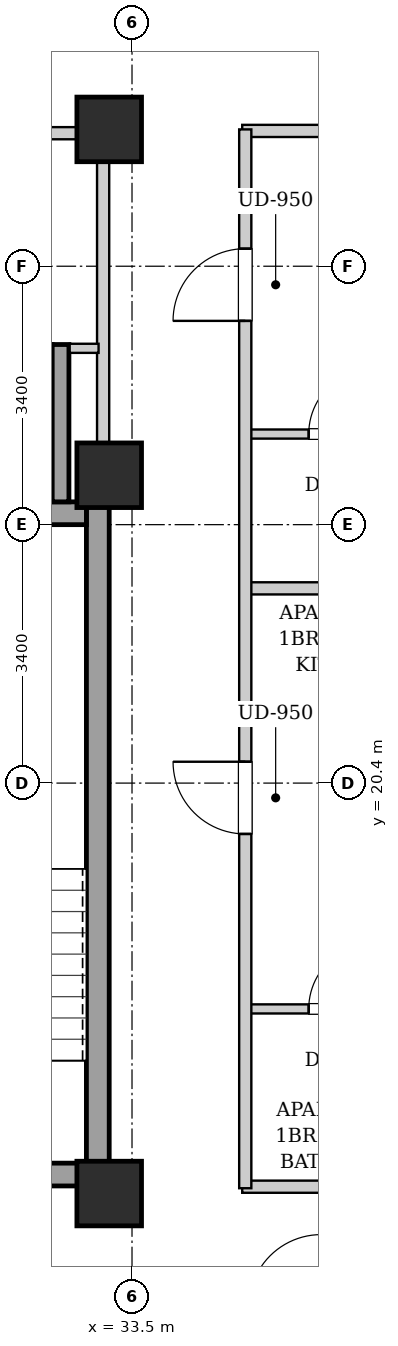
"""IFC4 building model, lengths in metres.
Left out: names, types, materials, properties, quantities, classifications, styles, units other than length and angle.
Written with IfcOpenShell. Run it as: python <this file> out.ifc"""

import sys

from ifc_helpers import new_model, si_unit, direction, frame, frame_2d, origin, origin_2d, place, context, subcontext, project, spatial, rectangle, extrude, element, fill, save


model = new_model("IFC4")
c1 = context("Model", 3, precision=1e-05, world=origin(), true_north=direction((0.0, 1.0)))
c2 = subcontext(c1, "Body", "Model", "MODEL_VIEW")
j1 = project(units=[si_unit("LENGTHUNIT", "METRE"), si_unit("PLANEANGLEUNIT", "RADIAN")], contexts=[c1])
p1 = place(None, origin())
s1 = spatial("IfcSite", under=j1, at=p1, CompositionType="ELEMENT")
p2 = place(p1, origin())
s2 = spatial("IfcBuilding", under=s1, at=p2, CompositionType="ELEMENT")
p3 = place(p2, frame((0.0, 0.0, 187.6)))
s3 = spatial("IfcBuildingStorey", under=s2, at=p3, CompositionType="ELEMENT", Elevation=187.6)
for number, where, z_axis, x_axis in (
    (1, (33.2, 15.0, 0.0), (0.0, 0.0, 1.0), (1.0, 0.0, 0.0)),
    (2, (33.2, 29.0, 0.0), (0.0, 0.0, 1.0), (1.0, 0.0, 0.0)),
    (3, (33.2, 24.45, 0.0), (0.0, 0.0, 1.0), (1.0, 0.0, 0.0)),
):
    element("IfcColumn", number, at=place(p3, frame(where, z_axis=z_axis, x_axis=x_axis)), inside=s3, PredefinedType="COLUMN", context=c2, shape_type="SweptSolid", body=[
        extrude(rectangle(XDim=0.85, YDim=0.85, at=origin_2d()), origin(), (0.0, 0.0, 1.0), 3.3),
    ])
p4 = place(p3, frame((33.05, 15.1, 0.0), z_axis=(0.0, 0.0, 1.0), x_axis=(0.0, 1.0, 0.0)))
e4 = element("IfcWall", 4, at=p4, inside=s3, PredefinedType="SHEAR", context=c2, shape_type="SweptSolid", body=[
    extrude(rectangle(XDim=9.0, YDim=0.3, at=frame_2d((4.5, 0.0))), origin(), (0.0, 0.0, 1.0), 3.04),
])
p5 = place(p3, frame((30.05, 23.95, 0.0), z_axis=(0.0, 0.0, 1.0), x_axis=(1.0, 0.0, 0.0)))
e5 = element("IfcWall", 5, at=p5, inside=s3, PredefinedType="SHEAR", context=c2, shape_type="SweptSolid", body=[
    extrude(rectangle(XDim=2.85, YDim=0.3, at=frame_2d((1.425, 0.0))), origin(), (0.0, 0.0, 1.0), 3.04),
])
p6 = place(p3, frame((30.05, 15.25, 0.0), z_axis=(0.0, 0.0, 1.0), x_axis=(1.0, 0.0, 0.0)))
e6 = element("IfcWall", 6, at=p6, inside=s3, PredefinedType="SHEAR", context=c2, shape_type="SweptSolid", body=[
    extrude(rectangle(XDim=2.85, YDim=0.3, at=frame_2d((1.425, 0.0))), origin(), (0.0, 0.0, 1.0), 3.04),
])
p7 = place(p6, frame((0.86, 0.0, 0.0)))
e7 = element("IfcOpeningElement", 7, at=p7, cuts=e6, PredefinedType="OPENING", context=c2, shape_type="SweptSolid", body=[
    extrude(rectangle(XDim=1.1, YDim=2.05, at=frame_2d((0.55, 1.025))), frame((0.0, 0.16, 0.0), z_axis=(0.0, -1.0, 0.0), x_axis=(1.0, 0.0, 0.0)), (0.0, 0.0, 1.0), 0.32),
])
p8 = place(p3, frame((32.56, 24.1, 0.0), z_axis=(0.0, 0.0, 1.0), x_axis=(0.0, 1.0, 0.0)))
e8 = element("IfcWall", 8, at=p8, inside=s3, PredefinedType="SHEAR", context=c2, shape_type="SweptSolid", body=[
    extrude(rectangle(XDim=2.07, YDim=0.22, at=frame_2d((1.035, 0.0))), origin(), (0.0, 0.0, 1.0), 3.04),
])
p9 = place(p3, frame((33.12, 24.12, 0.0), z_axis=(0.0, 0.0, 1.0), x_axis=(0.0, 1.0, 0.0)))
e9 = element("IfcWall", 9, at=p9, inside=s3, PredefinedType="PARTITIONING", context=c2, shape_type="SweptSolid", body=[
    extrude(rectangle(XDim=4.76, YDim=0.16, at=frame_2d((2.38, 0.0))), origin(), (0.0, 0.0, 1.0), 2.375),
])
p10 = place(p3, frame((32.68, 26.12, 0.0), z_axis=(0.0, 0.0, 1.0), x_axis=(1.0, 0.0, 0.0)))
e10 = element("IfcWall", 10, at=p10, inside=s3, PredefinedType="PARTITIONING", context=c2, shape_type="SweptSolid", body=[
    extrude(rectangle(XDim=0.38, YDim=0.12, at=frame_2d((0.19, 0.0))), origin(), (0.0, 0.0, 1.0), 3.04),
])
p11 = place(p3, frame((30.08, 28.95, 0.0), z_axis=(0.0, 0.0, 1.0), x_axis=(1.0, 0.0, 0.0)))
e11 = element("IfcWall", 11, at=p11, inside=s3, PredefinedType="PARTITIONING", context=c2, shape_type="SweptSolid", body=[
    extrude(rectangle(XDim=2.96, YDim=0.16, at=frame_2d((1.48, 0.0))), origin(), (0.0, 0.0, 1.0), 3.04),
])
p12 = place(p11, frame((1.045, 0.0, 0.0)))
e12 = element("IfcOpeningElement", 12, at=p12, cuts=e11, PredefinedType="OPENING", context=c2, shape_type="SweptSolid", body=[
    extrude(rectangle(XDim=0.86, YDim=2.05, at=frame_2d((0.43, 1.025))), frame((0.0, 0.09, 0.0), z_axis=(0.0, -1.0, 0.0), x_axis=(1.0, 0.0, 0.0)), (0.0, 0.0, 1.0), 0.18),
])
for number, where, z_axis, x_axis in (
    (13, (34.95, 15.09, 0.0), (0.0, 0.0, 1.0), (1.0, 0.0, 0.0)),
    (14, (34.95, 28.98, 0.0), (0.0, 0.0, 1.0), (1.0, 0.0, 0.0)),
):
    element("IfcWall", number, at=place(p3, frame(where, z_axis=z_axis, x_axis=x_axis)), inside=s3, PredefinedType="PARTITIONING", context=c2, shape_type="SweptSolid", body=[
        extrude(rectangle(XDim=5.07, YDim=0.16, at=frame_2d((2.535, 0.0))), origin(), (0.0, 0.0, 1.0), 2.556),
    ])
p13 = place(p3, frame((35.03, 22.962, 0.0), z_axis=(0.0, 0.0, 1.0), x_axis=(1.0, 0.0, 0.0)))
e15 = element("IfcWall", 15, at=p13, inside=s3, PredefinedType="PARTITIONING", context=c2, shape_type="SweptSolid", body=[
    extrude(rectangle(XDim=4.99, YDim=0.16, at=frame_2d((2.495, 0.0))), origin(), (0.0, 0.0, 1.0), 3.04),
])
p14 = place(p3, frame((35.03, 17.429, 0.0), z_axis=(0.0, 0.0, 1.0), x_axis=(1.0, 0.0, 0.0)))
e16 = element("IfcWall", 16, at=p14, inside=s3, PredefinedType="PARTITIONING", context=c2, shape_type="SweptSolid", body=[
    extrude(rectangle(XDim=2.45, YDim=0.12, at=frame_2d((1.225, 0.0))), origin(), (0.0, 0.0, 1.0), 3.04),
])
p15 = place(p14, frame((0.795, 0.0, 0.0)))
e17 = element("IfcOpeningElement", 17, at=p15, cuts=e16, PredefinedType="OPENING", context=c2, shape_type="SweptSolid", body=[
    extrude(rectangle(XDim=0.86, YDim=2.05, at=frame_2d((0.43, 1.025))), frame((0.0, 0.07, 0.0), z_axis=(0.0, -1.0, 0.0), x_axis=(1.0, 0.0, 0.0)), (0.0, 0.0, 1.0), 0.14),
])
p16 = place(p3, frame((35.03, 24.992, 0.0), z_axis=(0.0, 0.0, 1.0), x_axis=(1.0, 0.0, 0.0)))
e18 = element("IfcWall", 18, at=p16, inside=s3, PredefinedType="PARTITIONING", context=c2, shape_type="SweptSolid", body=[
    extrude(rectangle(XDim=2.45, YDim=0.12, at=frame_2d((1.225, 0.0))), origin(), (0.0, 0.0, 1.0), 3.04),
])
p17 = place(p16, frame((0.795, 0.0, 0.0)))
e19 = element("IfcOpeningElement", 19, at=p17, cuts=e18, PredefinedType="OPENING", context=c2, shape_type="SweptSolid", body=[
    extrude(rectangle(XDim=0.86, YDim=2.05, at=frame_2d((0.43, 1.025))), frame((0.0, 0.07, 0.0), z_axis=(0.0, -1.0, 0.0), x_axis=(1.0, 0.0, 0.0)), (0.0, 0.0, 1.0), 0.14),
])
p18 = place(p3, frame((34.99, 15.07, 0.0), z_axis=(0.0, 0.0, 1.0), x_axis=(0.0, 1.0, 0.0)))
e20 = element("IfcWall", 20, at=p18, inside=s3, PredefinedType="PARTITIONING", context=c2, shape_type="SweptSolid", body=[
    extrude(rectangle(XDim=13.93, YDim=0.16, at=frame_2d((6.965, 0.0))), origin(), (0.0, 0.0, 1.0), 3.04),
])
p19 = place(p18, frame((4.661, 0.0, 0.0)))
e21 = element("IfcOpeningElement", 21, at=p19, cuts=e20, PredefinedType="OPENING", context=c2, shape_type="SweptSolid", body=[
    extrude(rectangle(XDim=0.95, YDim=2.1, at=frame_2d((0.475, 1.05))), frame((0.0, 0.09, 0.0), z_axis=(0.0, -1.0, 0.0), x_axis=(1.0, 0.0, 0.0)), (0.0, 0.0, 1.0), 0.18),
])
p20 = place(p18, frame((11.411, 0.0, 0.0)))
e22 = element("IfcOpeningElement", 22, at=p20, cuts=e20, PredefinedType="OPENING", context=c2, shape_type="SweptSolid", body=[
    extrude(rectangle(XDim=0.95, YDim=2.1, at=frame_2d((0.475, 1.05))), frame((0.0, 0.09, 0.0), z_axis=(0.0, -1.0, 0.0), x_axis=(1.0, 0.0, 0.0)), (0.0, 0.0, 1.0), 0.18),
])
p21 = place(p15, origin())
e23 = element("IfcDoor", 23, at=p21, inside=s3, OperationType="SINGLE_SWING_RIGHT", PredefinedType="DOOR", context=c2, shape_type="SweptSolid", body=[
    extrude(rectangle(XDim=0.86, YDim=2.05, at=frame_2d((0.43, 1.025))), frame((0.0, 0.025, 0.0), z_axis=(0.0, -1.0, 0.0), x_axis=(1.0, 0.0, 0.0)), (0.0, 0.0, 1.0), 0.05),
])
fill(e17, e23)
p22 = place(p17, origin())
e24 = element("IfcDoor", 24, at=p22, inside=s3, OperationType="SINGLE_SWING_RIGHT", PredefinedType="DOOR", context=c2, shape_type="SweptSolid", body=[
    extrude(rectangle(XDim=0.86, YDim=2.05, at=frame_2d((0.43, 1.025))), frame((0.0, 0.025, 0.0), z_axis=(0.0, -1.0, 0.0), x_axis=(1.0, 0.0, 0.0)), (0.0, 0.0, 1.0), 0.05),
])
fill(e19, e24)
p23 = place(p19, origin())
e25 = element("IfcDoor", 25, at=p23, inside=s3, OperationType="SINGLE_SWING_RIGHT", PredefinedType="DOOR", context=c2, shape_type="SweptSolid", body=[
    extrude(rectangle(XDim=0.95, YDim=2.1, at=frame_2d((0.475, 1.05))), frame((0.0, 0.025, 0.0), z_axis=(0.0, -1.0, 0.0), x_axis=(1.0, 0.0, 0.0)), (0.0, 0.0, 1.0), 0.05),
])
fill(e21, e25)
p24 = place(p20, origin())
e26 = element("IfcDoor", 26, at=p24, inside=s3, OperationType="SINGLE_SWING_LEFT", PredefinedType="DOOR", context=c2, shape_type="SweptSolid", body=[
    extrude(rectangle(XDim=0.95, YDim=2.1, at=frame_2d((0.475, 1.05))), frame((0.0, 0.025, 0.0), z_axis=(0.0, -1.0, 0.0), x_axis=(1.0, 0.0, 0.0)), (0.0, 0.0, 1.0), 0.05),
])
fill(e22, e26)
save(model, sys.argv[1])
